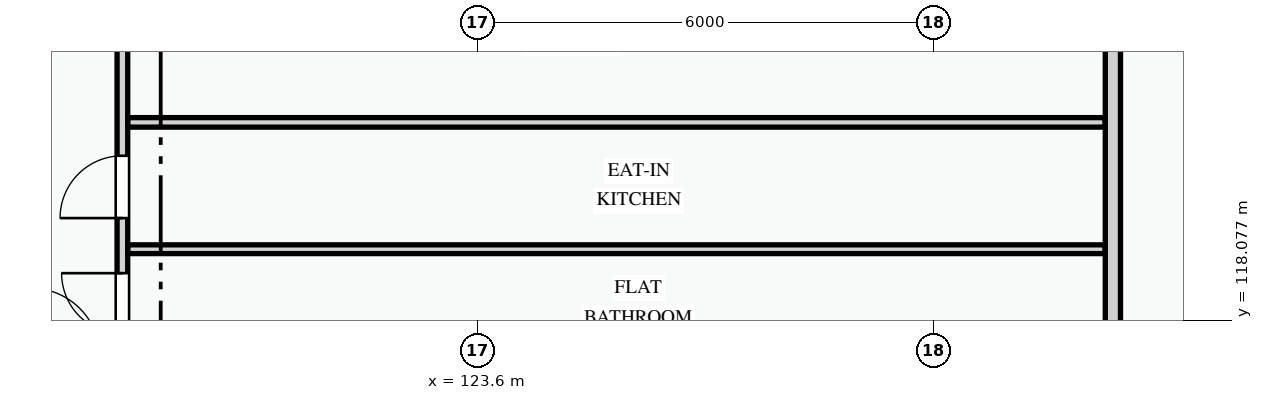
"""IFC4 building model, lengths in metres.
Left out: names, types, materials, properties, quantities, classifications, styles, units other than length and angle.
Written with IfcOpenShell. Run it as: python <this file> out.ifc"""

import sys

from ifc_helpers import new_model, si_unit, direction, frame, frame_2d, origin, place, context, subcontext, project, spatial, rectangle, extrude, element, fill, save


model = new_model("IFC4")
c1 = context("Model", 3, precision=1e-05, world=origin(), true_north=direction((0.0, 1.0)))
c2 = subcontext(c1, "Body", "Model", "MODEL_VIEW")
j1 = project(units=[si_unit("LENGTHUNIT", "METRE"), si_unit("PLANEANGLEUNIT", "RADIAN")], contexts=[c1])
p1 = place(None, origin())
s1 = spatial("IfcSite", under=j1, at=p1, CompositionType="ELEMENT")
p2 = place(p1, origin())
s2 = spatial("IfcBuilding", under=s1, at=p2, CompositionType="ELEMENT")
p3 = place(p2, frame((0.0, 0.0, 27.9)))
s3 = spatial("IfcBuildingStorey", under=s2, at=p3, CompositionType="ELEMENT", Elevation=27.9)
p4 = place(p3, frame((118.929, 117.665, 0.0), z_axis=(0.0, 0.0, 1.0), x_axis=(0.0, 1.0, 0.0)))
e1 = element("IfcWall", 1, at=p4, inside=s3, PredefinedType="PARTITIONING", context=c2, shape_type="SweptSolid", body=[
    extrude(rectangle(XDim=5.796, YDim=0.14, at=frame_2d((2.898, 0.0))), origin(), (0.0, 0.0, 1.0), 3.0),
])
p5 = place(p4, frame((0.231, 0.0, 0.0)))
e2 = element("IfcOpeningElement", 2, at=p5, cuts=e1, PredefinedType="OPENING", context=c2, shape_type="SweptSolid", body=[
    extrude(rectangle(XDim=0.8, YDim=2.1, at=frame_2d((0.4, 1.05))), frame((0.0, 0.08, 0.0), z_axis=(0.0, -1.0, 0.0), x_axis=(1.0, 0.0, 0.0)), (0.0, 0.0, 1.0), 0.16),
])
p6 = place(p4, frame((1.755, 0.0, 0.0)))
e3 = element("IfcOpeningElement", 3, at=p6, cuts=e1, PredefinedType="OPENING", context=c2, shape_type="SweptSolid", body=[
    extrude(rectangle(XDim=0.82, YDim=2.08, at=frame_2d((0.41, 1.04))), frame((0.0, 0.08, 0.0), z_axis=(0.0, -1.0, 0.0), x_axis=(1.0, 0.0, 0.0)), (0.0, 0.0, 1.0), 0.16),
])
p7 = place(p4, frame((4.02, 0.0, 0.0)))
e4 = element("IfcOpeningElement", 4, at=p7, cuts=e1, PredefinedType="OPENING", context=c2, shape_type="SweptSolid", body=[
    extrude(rectangle(XDim=0.85, YDim=2.1, at=frame_2d((0.425, 1.05))), frame((0.0, 0.08, 0.0), z_axis=(0.0, -1.0, 0.0), x_axis=(1.0, 0.0, 0.0)), (0.0, 0.0, 1.0), 0.16),
])
p8 = place(p3, frame((119.001, 120.679, 0.0), z_axis=(0.0, 0.0, 1.0), x_axis=(1.0, 0.0, 0.0)))
e5 = element("IfcWall", 5, at=p8, inside=s3, PredefinedType="PARTITIONING", context=c2, shape_type="SweptSolid", body=[
    extrude(rectangle(XDim=12.857, YDim=0.125, at=frame_2d((6.429, 0.0))), origin(), (0.0, 0.0, 1.0), 3.0),
])
p9 = place(p3, frame((119.001, 119.01, 0.0), z_axis=(0.0, 0.0, 1.0), x_axis=(1.0, 0.0, 0.0)))
e6 = element("IfcWall", 6, at=p9, inside=s3, PredefinedType="PARTITIONING", context=c2, shape_type="SweptSolid", body=[
    extrude(rectangle(XDim=12.857, YDim=0.115, at=frame_2d((6.429, 0.0))), origin(), (0.0, 0.0, 1.0), 3.0),
])
p10 = place(p3, frame((131.96, 117.665, 0.0), z_axis=(0.0, 0.0, 1.0), x_axis=(0.0, 1.0, 0.0)))
e7 = element("IfcWall", 7, at=p10, inside=s3, PredefinedType="PARTITIONING", context=c2, shape_type="SweptSolid", body=[
    extrude(rectangle(XDim=5.796, YDim=0.2, at=frame_2d((2.898, 0.0))), origin(), (0.0, 0.0, 1.0), 3.0),
])
p11 = place(p5, origin())
e8 = element("IfcDoor", 8, at=p11, inside=s3, OperationType="SINGLE_SWING_RIGHT", PredefinedType="DOOR", context=c2, shape_type="SweptSolid", body=[
    extrude(rectangle(XDim=0.8, YDim=2.1, at=frame_2d((0.4, 1.05))), frame((0.0, 0.025, 0.0), z_axis=(0.0, -1.0, 0.0), x_axis=(1.0, 0.0, 0.0)), (0.0, 0.0, 1.0), 0.05),
])
fill(e2, e8)
p12 = place(p6, origin())
e9 = element("IfcDoor", 9, at=p12, inside=s3, OperationType="SINGLE_SWING_LEFT", PredefinedType="DOOR", context=c2, shape_type="SweptSolid", body=[
    extrude(rectangle(XDim=0.82, YDim=2.08, at=frame_2d((0.41, 1.04))), frame((0.0, 0.025, 0.0), z_axis=(0.0, -1.0, 0.0), x_axis=(1.0, 0.0, 0.0)), (0.0, 0.0, 1.0), 0.05),
])
fill(e3, e9)
save(model, sys.argv[1])
